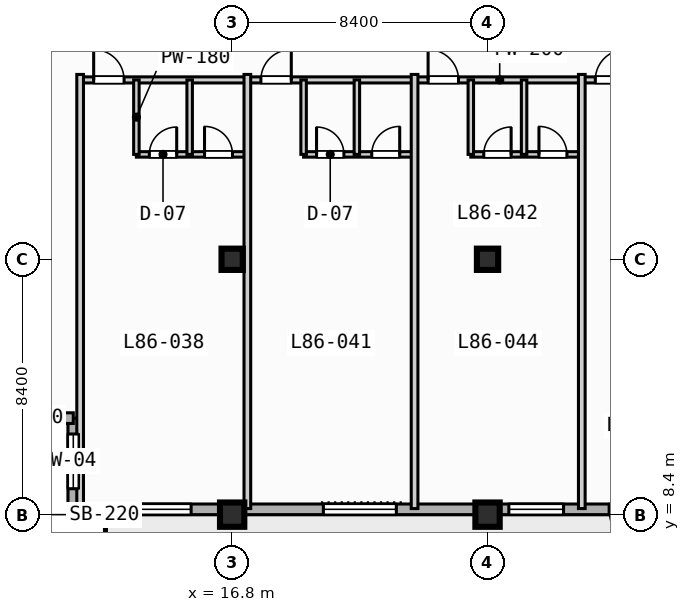
"""IFC4 building model, lengths in metres.
Left out: names, types, materials, properties, quantities, classifications, styles, units other than length and angle.
Written with IfcOpenShell. Run it as: python <this file> out.ifc"""

import sys

from ifc_helpers import new_model, si_unit, direction, frame, frame_2d, origin, origin_2d, place, context, subcontext, project, spatial, rectangle, extrude, element, fill, save


model = new_model("IFC4")
c1 = context("Model", 3, precision=1e-05, world=origin(), true_north=direction((0.0, 1.0)))
c2 = subcontext(c1, "Body", "Model", "MODEL_VIEW")
j1 = project(units=[si_unit("LENGTHUNIT", "METRE"), si_unit("PLANEANGLEUNIT", "RADIAN")], contexts=[c1])
p1 = place(None, origin())
s1 = spatial("IfcSite", under=j1, at=p1, CompositionType="ELEMENT")
p2 = place(p1, origin())
s2 = spatial("IfcBuilding", under=s1, at=p2, CompositionType="ELEMENT")
p3 = place(p2, frame((0.0, 0.0, 347.6)))
s3 = spatial("IfcBuildingStorey", under=s2, at=p3, CompositionType="ELEMENT", Elevation=347.6)
p4 = place(p3, frame((16.8, 8.4, 0.0), z_axis=(0.0, 0.0, 1.0), x_axis=(1.0, 0.0, 0.0)))
e1 = element("IfcColumn", 1, at=p4, inside=s3, PredefinedType="COLUMN", context=c2, shape_type="SweptSolid", body=[
    extrude(rectangle(XDim=0.8, YDim=0.8, at=origin_2d()), origin(), (0.0, 0.0, 1.0), 3.9),
])
p5 = place(p3, frame((16.8, 16.8, 0.0), z_axis=(0.0, 0.0, 1.0), x_axis=(1.0, 0.0, 0.0)))
e2 = element("IfcColumn", 2, at=p5, inside=s3, PredefinedType="COLUMN", context=c2, shape_type="SweptSolid", body=[
    extrude(rectangle(XDim=0.7, YDim=0.7, at=origin_2d()), origin(), (0.0, 0.0, 1.0), 3.9),
])
p6 = place(p3, frame((25.2, 8.4, 0.0), z_axis=(0.0, 0.0, 1.0), x_axis=(1.0, 0.0, 0.0)))
e3 = element("IfcColumn", 3, at=p6, inside=s3, PredefinedType="COLUMN", context=c2, shape_type="SweptSolid", body=[
    extrude(rectangle(XDim=0.8, YDim=0.8, at=origin_2d()), origin(), (0.0, 0.0, 1.0), 3.9),
])
p7 = place(p3, frame((25.2, 16.8, 0.0), z_axis=(0.0, 0.0, 1.0), x_axis=(1.0, 0.0, 0.0)))
e4 = element("IfcColumn", 4, at=p7, inside=s3, PredefinedType="COLUMN", context=c2, shape_type="SweptSolid", body=[
    extrude(rectangle(XDim=0.7, YDim=0.7, at=origin_2d()), origin(), (0.0, 0.0, 1.0), 3.9),
])
p8 = place(p3, frame((11.575, 8.575, 0.0), z_axis=(0.0, 0.0, 1.0), x_axis=(0.0, 1.0, 0.0)))
e5 = element("IfcWall", 5, at=p8, inside=s3, PredefinedType="STANDARD", context=c2, shape_type="SweptSolid", body=[
    extrude(rectangle(XDim=3.0, YDim=0.35, at=frame_2d((1.5, 0.0))), origin(), (0.0, 0.0, 1.0), 3.67),
])
p9 = place(p8, frame((0.677, 0.0, 0.85)))
e6 = element("IfcOpeningElement", 6, at=p9, cuts=e5, PredefinedType="OPENING", context=c2, shape_type="SweptSolid", body=[
    extrude(rectangle(XDim=1.8, YDim=1.8, at=frame_2d((0.9, 0.9))), frame((0.0, 0.185, 0.0), z_axis=(0.0, -1.0, 0.0), x_axis=(1.0, 0.0, 0.0)), (0.0, 0.0, 1.0), 0.37),
])
p10 = place(p3, frame((11.575, 11.575, 0.0), z_axis=(0.0, 0.0, 1.0), x_axis=(-1.0, 0.0, 0.0)))
e7 = element("IfcWall", 7, at=p10, inside=s3, PredefinedType="STANDARD", context=c2, shape_type="SweptSolid", body=[
    extrude(rectangle(XDim=3.0, YDim=0.35, at=frame_2d((1.5, 0.0))), origin(), (0.0, 0.0, 1.0), 3.67),
])
p11 = place(p3, frame((64.025, 8.575, 0.0), z_axis=(0.0, 0.0, 1.0), x_axis=(-1.0, 0.0, 0.0)))
e8 = element("IfcWall", 8, at=p11, inside=s3, PredefinedType="STANDARD", context=c2, shape_type="SweptSolid", body=[
    extrude(rectangle(XDim=52.45, YDim=0.35, at=frame_2d((26.225, 0.0))), origin(), (0.0, 0.0, 1.0), 3.67),
])
p12 = place(p11, frame((33.425, 0.0, 0.0)))
e9 = element("IfcOpeningElement", 9, at=p12, cuts=e8, PredefinedType="OPENING", context=c2, shape_type="SweptSolid", body=[
    extrude(rectangle(XDim=1.4, YDim=2.2, at=frame_2d((0.7, 1.1))), frame((0.0, 0.185, 0.0), z_axis=(0.0, -1.0, 0.0), x_axis=(1.0, 0.0, 0.0)), (0.0, 0.0, 1.0), 0.37),
])
p13 = place(p11, frame((41.825, 0.0, 0.85)))
e10 = element("IfcOpeningElement", 10, at=p13, cuts=e8, PredefinedType="OPENING", context=c2, shape_type="SweptSolid", body=[
    extrude(rectangle(XDim=2.4, YDim=1.95, at=frame_2d((1.2, 0.975))), frame((0.0, 0.185, 0.0), z_axis=(0.0, -1.0, 0.0), x_axis=(1.0, 0.0, 0.0)), (0.0, 0.0, 1.0), 0.37),
])
p14 = place(p11, frame((25.025, 0.0, 0.85)))
e11 = element("IfcOpeningElement", 11, at=p14, cuts=e8, PredefinedType="OPENING", context=c2, shape_type="SweptSolid", body=[
    extrude(rectangle(XDim=2.4, YDim=1.95, at=frame_2d((1.2, 0.975))), frame((0.0, 0.185, 0.0), z_axis=(0.0, -1.0, 0.0), x_axis=(1.0, 0.0, 0.0)), (0.0, 0.0, 1.0), 0.37),
])
p15 = place(p11, frame((16.925, 0.0, 0.85)))
e12 = element("IfcOpeningElement", 12, at=p15, cuts=e8, PredefinedType="OPENING", context=c2, shape_type="SweptSolid", body=[
    extrude(rectangle(XDim=1.8, YDim=1.8, at=frame_2d((0.9, 0.9))), frame((0.0, 0.185, 0.0), z_axis=(0.0, -1.0, 0.0), x_axis=(1.0, 0.0, 0.0)), (0.0, 0.0, 1.0), 0.37),
])
p16 = place(p11, frame((48.575, 0.0, 0.85)))
e13 = element("IfcOpeningElement", 13, at=p16, cuts=e8, PredefinedType="OPENING", context=c2, shape_type="SweptSolid", body=[
    extrude(rectangle(XDim=1.8, YDim=1.8, at=frame_2d((0.9, 0.9))), frame((0.0, 0.185, 0.0), z_axis=(0.0, -1.0, 0.0), x_axis=(1.0, 0.0, 0.0)), (0.0, 0.0, 1.0), 0.37),
])
p17 = place(p11, frame((36.325, 0.0, 0.85)))
e14 = element("IfcOpeningElement", 14, at=p17, cuts=e8, PredefinedType="OPENING", context=c2, shape_type="SweptSolid", body=[
    extrude(rectangle(XDim=1.8, YDim=1.8, at=frame_2d((0.9, 0.9))), frame((0.0, 0.185, 0.0), z_axis=(0.0, -1.0, 0.0), x_axis=(1.0, 0.0, 0.0)), (0.0, 0.0, 1.0), 0.37),
])
p18 = place(p3, frame((11.8, 22.7, 0.0), z_axis=(0.0, 0.0, 1.0), x_axis=(1.0, 0.0, 0.0)))
e15 = element("IfcWall", 15, at=p18, inside=s3, PredefinedType="PARTITIONING", context=c2, shape_type="SweptSolid", body=[
    extrude(rectangle(XDim=27.6, YDim=0.2, at=frame_2d((13.8, 0.0))), origin(), (0.0, 0.0, 1.0), 3.67),
])
p19 = place(p18, frame((0.445, 0.0, 0.0)))
e16 = element("IfcOpeningElement", 16, at=p19, cuts=e15, PredefinedType="OPENING", context=c2, shape_type="SweptSolid", body=[
    extrude(rectangle(XDim=1.0, YDim=2.15, at=frame_2d((0.5, 1.075))), frame((0.0, 0.11, 0.0), z_axis=(0.0, -1.0, 0.0), x_axis=(1.0, 0.0, 0.0)), (0.0, 0.0, 1.0), 0.22),
])
p20 = place(p18, frame((5.945, 0.0, 0.0)))
e17 = element("IfcOpeningElement", 17, at=p20, cuts=e15, PredefinedType="OPENING", context=c2, shape_type="SweptSolid", body=[
    extrude(rectangle(XDim=1.0, YDim=2.15, at=frame_2d((0.5, 1.075))), frame((0.0, 0.11, 0.0), z_axis=(0.0, -1.0, 0.0), x_axis=(1.0, 0.0, 0.0)), (0.0, 0.0, 1.0), 0.22),
])
p21 = place(p18, frame((11.445, 0.0, 0.0)))
e18 = element("IfcOpeningElement", 18, at=p21, cuts=e15, PredefinedType="OPENING", context=c2, shape_type="SweptSolid", body=[
    extrude(rectangle(XDim=1.0, YDim=2.15, at=frame_2d((0.5, 1.075))), frame((0.0, 0.11, 0.0), z_axis=(0.0, -1.0, 0.0), x_axis=(1.0, 0.0, 0.0)), (0.0, 0.0, 1.0), 0.22),
])
p22 = place(p18, frame((16.945, 0.0, 0.0)))
e19 = element("IfcOpeningElement", 19, at=p22, cuts=e15, PredefinedType="OPENING", context=c2, shape_type="SweptSolid", body=[
    extrude(rectangle(XDim=1.0, YDim=2.15, at=frame_2d((0.5, 1.075))), frame((0.0, 0.11, 0.0), z_axis=(0.0, -1.0, 0.0), x_axis=(1.0, 0.0, 0.0)), (0.0, 0.0, 1.0), 0.22),
])
p23 = place(p18, frame((22.445, 0.0, 0.0)))
e20 = element("IfcOpeningElement", 20, at=p23, cuts=e15, PredefinedType="OPENING", context=c2, shape_type="SweptSolid", body=[
    extrude(rectangle(XDim=1.0, YDim=2.15, at=frame_2d((0.5, 1.075))), frame((0.0, 0.11, 0.0), z_axis=(0.0, -1.0, 0.0), x_axis=(1.0, 0.0, 0.0)), (0.0, 0.0, 1.0), 0.22),
])
p24 = place(p3, frame((11.8, 8.6, 0.0), z_axis=(0.0, 0.0, 1.0), x_axis=(0.0, 1.0, 0.0)))
e21 = element("IfcWall", 21, at=p24, inside=s3, PredefinedType="PARTITIONING", context=c2, shape_type="SweptSolid", body=[
    extrude(rectangle(XDim=14.28, YDim=0.22, at=frame_2d((7.14, 0.0))), origin(), (0.0, 0.0, 1.0), 3.67),
])
p25 = place(p3, frame((13.65, 20.25, 0.0), z_axis=(0.0, 0.0, 1.0), x_axis=(1.0, 0.0, 0.0)))
e22 = element("IfcWall", 22, at=p25, inside=s3, PredefinedType="PLUMBINGWALL", context=c2, shape_type="SweptSolid", body=[
    extrude(rectangle(XDim=3.65, YDim=0.18, at=frame_2d((1.825, 0.0))), origin(), (0.0, 0.0, 1.0), 3.67),
])
p26 = place(p25, frame((0.426, 0.0, 0.0)))
e23 = element("IfcOpeningElement", 23, at=p26, cuts=e22, PredefinedType="OPENING", context=c2, shape_type="SweptSolid", body=[
    extrude(rectangle(XDim=0.9, YDim=2.1, at=frame_2d((0.45, 1.05))), frame((0.0, 0.1, 0.0), z_axis=(0.0, -1.0, 0.0), x_axis=(1.0, 0.0, 0.0)), (0.0, 0.0, 1.0), 0.2),
])
p27 = place(p25, frame((2.241, 0.0, 0.0)))
e24 = element("IfcOpeningElement", 24, at=p27, cuts=e22, PredefinedType="OPENING", context=c2, shape_type="SweptSolid", body=[
    extrude(rectangle(XDim=0.92, YDim=2.1, at=frame_2d((0.46, 1.05))), frame((0.0, 0.1, 0.0), z_axis=(0.0, -1.0, 0.0), x_axis=(1.0, 0.0, 0.0)), (0.0, 0.0, 1.0), 0.2),
])
for number, where, z_axis, x_axis in (
    (25, (13.65, 20.25, 0.0), (0.0, 0.0, 1.0), (0.0, 1.0, 0.0)),
    (26, (15.402, 20.25, 0.0), (0.0, 0.0, 1.0), (0.0, 1.0, 0.0)),
):
    element("IfcWall", number, at=place(p3, frame(where, z_axis=z_axis, x_axis=x_axis)), inside=s3, PredefinedType="PLUMBINGWALL", context=c2, shape_type="SweptSolid", body=[
        extrude(rectangle(XDim=2.45, YDim=0.18, at=frame_2d((1.225, 0.0))), origin(), (0.0, 0.0, 1.0), 3.67),
    ])
p28 = place(p3, frame((17.3, 8.6, 0.0), z_axis=(0.0, 0.0, 1.0), x_axis=(0.0, 1.0, 0.0)))
e27 = element("IfcWall", 27, at=p28, inside=s3, PredefinedType="PARTITIONING", context=c2, shape_type="SweptSolid", body=[
    extrude(rectangle(XDim=14.28, YDim=0.22, at=frame_2d((7.14, 0.0))), origin(), (0.0, 0.0, 1.0), 3.67),
])
p29 = place(p3, frame((19.15, 20.25, 0.0), z_axis=(0.0, 0.0, 1.0), x_axis=(1.0, 0.0, 0.0)))
e28 = element("IfcWall", 28, at=p29, inside=s3, PredefinedType="PLUMBINGWALL", context=c2, shape_type="SweptSolid", body=[
    extrude(rectangle(XDim=3.65, YDim=0.18, at=frame_2d((1.825, 0.0))), origin(), (0.0, 0.0, 1.0), 3.67),
])
p30 = place(p29, frame((0.426, 0.0, 0.0)))
e29 = element("IfcOpeningElement", 29, at=p30, cuts=e28, PredefinedType="OPENING", context=c2, shape_type="SweptSolid", body=[
    extrude(rectangle(XDim=0.9, YDim=2.1, at=frame_2d((0.45, 1.05))), frame((0.0, 0.1, 0.0), z_axis=(0.0, -1.0, 0.0), x_axis=(1.0, 0.0, 0.0)), (0.0, 0.0, 1.0), 0.2),
])
p31 = place(p29, frame((2.241, 0.0, 0.0)))
e30 = element("IfcOpeningElement", 30, at=p31, cuts=e28, PredefinedType="OPENING", context=c2, shape_type="SweptSolid", body=[
    extrude(rectangle(XDim=0.92, YDim=2.1, at=frame_2d((0.46, 1.05))), frame((0.0, 0.1, 0.0), z_axis=(0.0, -1.0, 0.0), x_axis=(1.0, 0.0, 0.0)), (0.0, 0.0, 1.0), 0.2),
])
for number, where, z_axis, x_axis in (
    (31, (19.15, 20.25, 0.0), (0.0, 0.0, 1.0), (0.0, 1.0, 0.0)),
    (32, (20.902, 20.25, 0.0), (0.0, 0.0, 1.0), (0.0, 1.0, 0.0)),
):
    element("IfcWall", number, at=place(p3, frame(where, z_axis=z_axis, x_axis=x_axis)), inside=s3, PredefinedType="PLUMBINGWALL", context=c2, shape_type="SweptSolid", body=[
        extrude(rectangle(XDim=2.45, YDim=0.18, at=frame_2d((1.225, 0.0))), origin(), (0.0, 0.0, 1.0), 3.67),
    ])
p32 = place(p3, frame((22.8, 8.6, 0.0), z_axis=(0.0, 0.0, 1.0), x_axis=(0.0, 1.0, 0.0)))
e33 = element("IfcWall", 33, at=p32, inside=s3, PredefinedType="PARTITIONING", context=c2, shape_type="SweptSolid", body=[
    extrude(rectangle(XDim=14.28, YDim=0.22, at=frame_2d((7.14, 0.0))), origin(), (0.0, 0.0, 1.0), 3.67),
])
p33 = place(p3, frame((24.65, 20.25, 0.0), z_axis=(0.0, 0.0, 1.0), x_axis=(1.0, 0.0, 0.0)))
e34 = element("IfcWall", 34, at=p33, inside=s3, PredefinedType="PLUMBINGWALL", context=c2, shape_type="SweptSolid", body=[
    extrude(rectangle(XDim=3.65, YDim=0.18, at=frame_2d((1.825, 0.0))), origin(), (0.0, 0.0, 1.0), 3.67),
])
p34 = place(p33, frame((0.426, 0.0, 0.0)))
e35 = element("IfcOpeningElement", 35, at=p34, cuts=e34, PredefinedType="OPENING", context=c2, shape_type="SweptSolid", body=[
    extrude(rectangle(XDim=0.9, YDim=2.1, at=frame_2d((0.45, 1.05))), frame((0.0, 0.1, 0.0), z_axis=(0.0, -1.0, 0.0), x_axis=(1.0, 0.0, 0.0)), (0.0, 0.0, 1.0), 0.2),
])
p35 = place(p33, frame((2.241, 0.0, 0.0)))
e36 = element("IfcOpeningElement", 36, at=p35, cuts=e34, PredefinedType="OPENING", context=c2, shape_type="SweptSolid", body=[
    extrude(rectangle(XDim=0.92, YDim=2.1, at=frame_2d((0.46, 1.05))), frame((0.0, 0.1, 0.0), z_axis=(0.0, -1.0, 0.0), x_axis=(1.0, 0.0, 0.0)), (0.0, 0.0, 1.0), 0.2),
])
for number, where, z_axis, x_axis in (
    (37, (24.65, 20.25, 0.0), (0.0, 0.0, 1.0), (0.0, 1.0, 0.0)),
    (38, (26.402, 20.25, 0.0), (0.0, 0.0, 1.0), (0.0, 1.0, 0.0)),
):
    element("IfcWall", number, at=place(p3, frame(where, z_axis=z_axis, x_axis=x_axis)), inside=s3, PredefinedType="PLUMBINGWALL", context=c2, shape_type="SweptSolid", body=[
        extrude(rectangle(XDim=2.45, YDim=0.18, at=frame_2d((1.225, 0.0))), origin(), (0.0, 0.0, 1.0), 3.67),
    ])
p36 = place(p3, frame((28.3, 8.6, 0.0), z_axis=(0.0, 0.0, 1.0), x_axis=(0.0, 1.0, 0.0)))
e39 = element("IfcWall", 39, at=p36, inside=s3, PredefinedType="PARTITIONING", context=c2, shape_type="SweptSolid", body=[
    extrude(rectangle(XDim=14.28, YDim=0.22, at=frame_2d((7.14, 0.0))), origin(), (0.0, 0.0, 1.0), 3.67),
])
p37 = place(p9, origin())
e40 = element("IfcWindow", 40, at=p37, inside=s3, PartitioningType="SINGLE_PANEL", PredefinedType="WINDOW", context=c2, shape_type="SweptSolid", body=[
    extrude(rectangle(XDim=1.8, YDim=1.8, at=frame_2d((0.9, 0.9))), frame((0.0, 0.03, 0.0), z_axis=(0.0, -1.0, 0.0), x_axis=(1.0, 0.0, 0.0)), (0.0, 0.0, 1.0), 0.06),
])
fill(e6, e40)
p38 = place(p12, origin())
e41 = element("IfcDoor", 41, at=p38, inside=s3, OperationType="SINGLE_SWING_LEFT", PredefinedType="DOOR", context=c2, shape_type="SweptSolid", body=[
    extrude(rectangle(XDim=1.4, YDim=2.2, at=frame_2d((0.7, 1.1))), frame((0.0, 0.025, 0.0), z_axis=(0.0, -1.0, 0.0), x_axis=(1.0, 0.0, 0.0)), (0.0, 0.0, 1.0), 0.05),
])
fill(e9, e41)
p39 = place(p13, origin())
e42 = element("IfcWindow", 42, at=p39, inside=s3, PartitioningType="SINGLE_PANEL", PredefinedType="WINDOW", context=c2, shape_type="SweptSolid", body=[
    extrude(rectangle(XDim=2.4, YDim=1.95, at=frame_2d((1.2, 0.975))), frame((0.0, 0.03, 0.0), z_axis=(0.0, -1.0, 0.0), x_axis=(1.0, 0.0, 0.0)), (0.0, 0.0, 1.0), 0.06),
])
fill(e10, e42)
p40 = place(p16, origin())
e43 = element("IfcWindow", 43, at=p40, inside=s3, PartitioningType="SINGLE_PANEL", PredefinedType="WINDOW", context=c2, shape_type="SweptSolid", body=[
    extrude(rectangle(XDim=1.8, YDim=1.8, at=frame_2d((0.9, 0.9))), frame((0.0, 0.03, 0.0), z_axis=(0.0, -1.0, 0.0), x_axis=(1.0, 0.0, 0.0)), (0.0, 0.0, 1.0), 0.06),
])
fill(e13, e43)
p41 = place(p17, origin())
e44 = element("IfcWindow", 44, at=p41, inside=s3, PartitioningType="SINGLE_PANEL", PredefinedType="WINDOW", context=c2, shape_type="SweptSolid", body=[
    extrude(rectangle(XDim=1.8, YDim=1.8, at=frame_2d((0.9, 0.9))), frame((0.0, 0.03, 0.0), z_axis=(0.0, -1.0, 0.0), x_axis=(1.0, 0.0, 0.0)), (0.0, 0.0, 1.0), 0.06),
])
fill(e14, e44)
p42 = place(p19, origin())
e45 = element("IfcDoor", 45, at=p42, inside=s3, OperationType="SINGLE_SWING_LEFT", PredefinedType="DOOR", context=c2, shape_type="SweptSolid", body=[
    extrude(rectangle(XDim=1.0, YDim=2.15, at=frame_2d((0.5, 1.075))), frame((0.0, 0.025, 0.0), z_axis=(0.0, -1.0, 0.0), x_axis=(1.0, 0.0, 0.0)), (0.0, 0.0, 1.0), 0.05),
])
fill(e16, e45)
p43 = place(p20, origin())
e46 = element("IfcDoor", 46, at=p43, inside=s3, OperationType="SINGLE_SWING_RIGHT", PredefinedType="DOOR", context=c2, shape_type="SweptSolid", body=[
    extrude(rectangle(XDim=1.0, YDim=2.15, at=frame_2d((0.5, 1.075))), frame((0.0, 0.025, 0.0), z_axis=(0.0, -1.0, 0.0), x_axis=(1.0, 0.0, 0.0)), (0.0, 0.0, 1.0), 0.05),
])
fill(e17, e46)
p44 = place(p21, origin())
e47 = element("IfcDoor", 47, at=p44, inside=s3, OperationType="SINGLE_SWING_LEFT", PredefinedType="DOOR", context=c2, shape_type="SweptSolid", body=[
    extrude(rectangle(XDim=1.0, YDim=2.15, at=frame_2d((0.5, 1.075))), frame((0.0, 0.025, 0.0), z_axis=(0.0, -1.0, 0.0), x_axis=(1.0, 0.0, 0.0)), (0.0, 0.0, 1.0), 0.05),
])
fill(e18, e47)
p45 = place(p22, origin())
e48 = element("IfcDoor", 48, at=p45, inside=s3, OperationType="SINGLE_SWING_RIGHT", PredefinedType="DOOR", context=c2, shape_type="SweptSolid", body=[
    extrude(rectangle(XDim=1.0, YDim=2.15, at=frame_2d((0.5, 1.075))), frame((0.0, 0.025, 0.0), z_axis=(0.0, -1.0, 0.0), x_axis=(1.0, 0.0, 0.0)), (0.0, 0.0, 1.0), 0.05),
])
fill(e19, e48)
p46 = place(p26, origin())
e49 = element("IfcDoor", 49, at=p46, inside=s3, OperationType="SINGLE_SWING_RIGHT", PredefinedType="DOOR", context=c2, shape_type="SweptSolid", body=[
    extrude(rectangle(XDim=0.9, YDim=2.1, at=frame_2d((0.45, 1.05))), frame((0.0, 0.025, 0.0), z_axis=(0.0, -1.0, 0.0), x_axis=(1.0, 0.0, 0.0)), (0.0, 0.0, 1.0), 0.05),
])
fill(e23, e49)
p47 = place(p27, origin())
e50 = element("IfcDoor", 50, at=p47, inside=s3, OperationType="SINGLE_SWING_LEFT", PredefinedType="DOOR", context=c2, shape_type="SweptSolid", body=[
    extrude(rectangle(XDim=0.92, YDim=2.1, at=frame_2d((0.46, 1.05))), frame((0.0, 0.025, 0.0), z_axis=(0.0, -1.0, 0.0), x_axis=(1.0, 0.0, 0.0)), (0.0, 0.0, 1.0), 0.05),
])
fill(e24, e50)
p48 = place(p30, origin())
e51 = element("IfcDoor", 51, at=p48, inside=s3, OperationType="SINGLE_SWING_LEFT", PredefinedType="DOOR", context=c2, shape_type="SweptSolid", body=[
    extrude(rectangle(XDim=0.9, YDim=2.1, at=frame_2d((0.45, 1.05))), frame((0.0, 0.025, 0.0), z_axis=(0.0, -1.0, 0.0), x_axis=(1.0, 0.0, 0.0)), (0.0, 0.0, 1.0), 0.05),
])
fill(e29, e51)
p49 = place(p31, origin())
e52 = element("IfcDoor", 52, at=p49, inside=s3, OperationType="SINGLE_SWING_RIGHT", PredefinedType="DOOR", context=c2, shape_type="SweptSolid", body=[
    extrude(rectangle(XDim=0.92, YDim=2.1, at=frame_2d((0.46, 1.05))), frame((0.0, 0.025, 0.0), z_axis=(0.0, -1.0, 0.0), x_axis=(1.0, 0.0, 0.0)), (0.0, 0.0, 1.0), 0.05),
])
fill(e30, e52)
p50 = place(p34, origin())
e53 = element("IfcDoor", 53, at=p50, inside=s3, OperationType="SINGLE_SWING_RIGHT", PredefinedType="DOOR", context=c2, shape_type="SweptSolid", body=[
    extrude(rectangle(XDim=0.9, YDim=2.1, at=frame_2d((0.45, 1.05))), frame((0.0, 0.025, 0.0), z_axis=(0.0, -1.0, 0.0), x_axis=(1.0, 0.0, 0.0)), (0.0, 0.0, 1.0), 0.05),
])
fill(e35, e53)
p51 = place(p35, origin())
e54 = element("IfcDoor", 54, at=p51, inside=s3, OperationType="SINGLE_SWING_LEFT", PredefinedType="DOOR", context=c2, shape_type="SweptSolid", body=[
    extrude(rectangle(XDim=0.92, YDim=2.1, at=frame_2d((0.46, 1.05))), frame((0.0, 0.025, 0.0), z_axis=(0.0, -1.0, 0.0), x_axis=(1.0, 0.0, 0.0)), (0.0, 0.0, 1.0), 0.05),
])
fill(e36, e54)
save(model, sys.argv[1])
